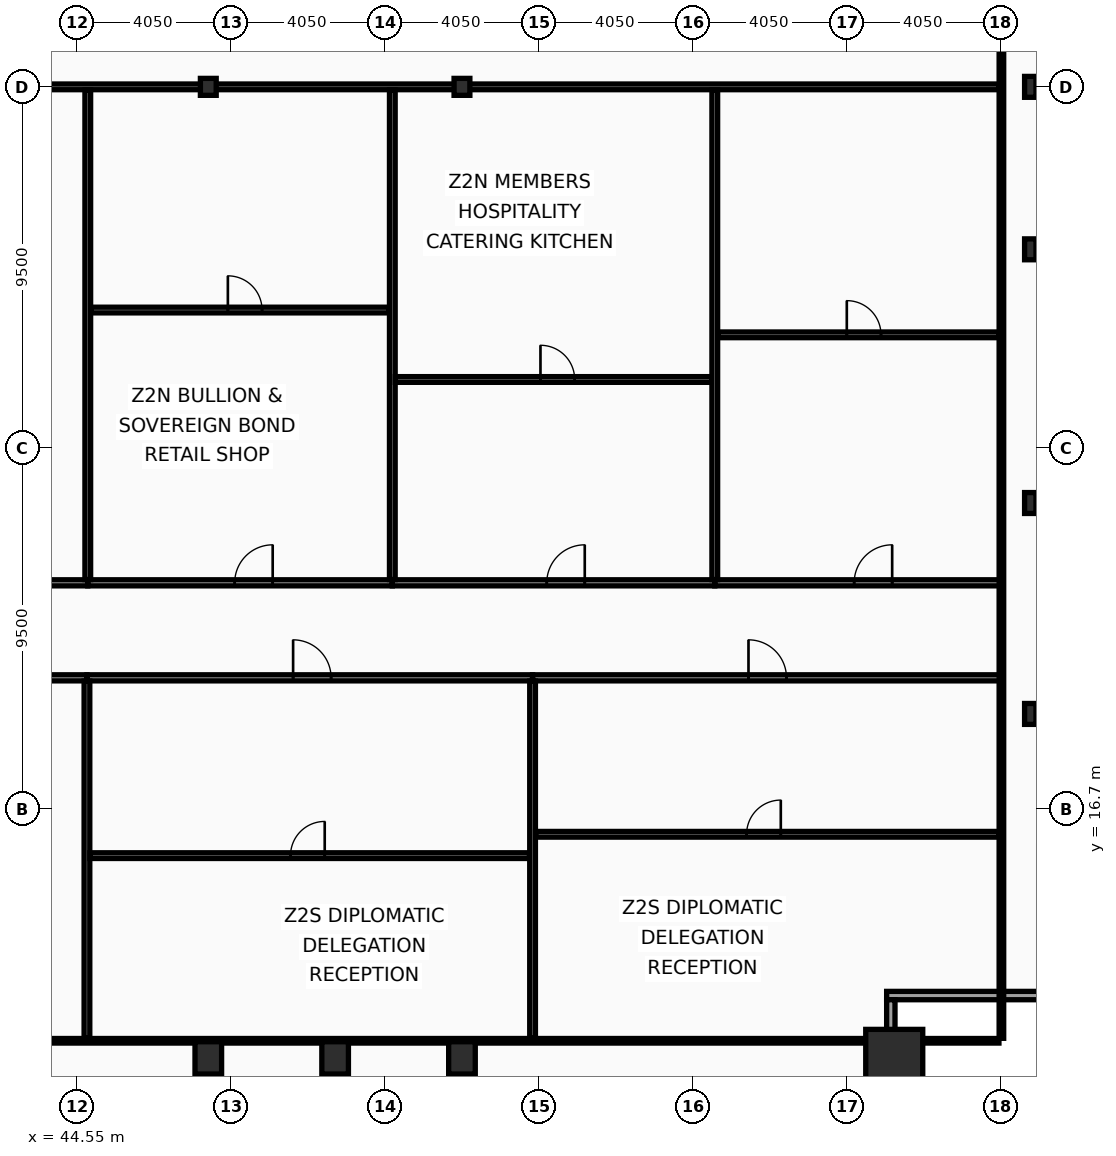
"""IFC4 building model, lengths in metres.
Left out: names, types, materials, properties, quantities, classifications, styles, units other than length and angle.
Written with IfcOpenShell. Run it as: python <this file> out.ifc"""

import sys

from ifc_helpers import new_model, si_unit, direction, frame, frame_2d, origin, origin_2d, place, context, subcontext, project, spatial, rectangle, hollow_rectangle, i_section, extrude, element, fill, save


model = new_model("IFC4")
c1 = context("Model", 3, precision=1e-05, world=origin(), true_north=direction((0.0, 1.0)))
c2 = subcontext(c1, "Body", "Model", "MODEL_VIEW")
j1 = project(units=[si_unit("LENGTHUNIT", "METRE"), si_unit("PLANEANGLEUNIT", "RADIAN")], contexts=[c1])
p1 = place(None, origin())
s1 = spatial("IfcSite", under=j1, at=p1, CompositionType="ELEMENT")
p2 = place(p1, origin())
s2 = spatial("IfcBuilding", under=s1, at=p2, CompositionType="ELEMENT")
p3 = place(p2, frame((0.0, 0.0, 121.8)))
s3 = spatial("IfcBuildingStorey", under=s2, at=p3, CompositionType="ELEMENT", Elevation=121.8)
p4 = place(p3, frame((66.05, 10.15, 0.0), z_axis=(0.0, 0.0, 1.0), x_axis=(1.0, 0.0, 0.0)))
e1 = element("IfcColumn", 1, at=p4, inside=s3, PredefinedType="COLUMN", context=c2, shape_type="SweptSolid", body=[
    extrude(hollow_rectangle(XDim=1.5, YDim=1.5, WallThickness=0.07, at=origin_2d()), origin(), (0.0, 0.0, 1.0), 3.6),
])
for number, where, z_axis, x_axis in (
    (2, (48.0, 10.15, 0.0), (0.0, 0.0, 1.0), (1.0, 0.0, 0.0)),
    (3, (51.337, 10.15, 0.0), (0.0, 0.0, 1.0), (1.0, 0.0, 0.0)),
    (4, (54.675, 10.15, 0.0), (0.0, 0.0, 1.0), (1.0, 0.0, 0.0)),
):
    element("IfcColumn", number, at=place(p3, frame(where, z_axis=z_axis, x_axis=x_axis)), inside=s3, PredefinedType="COLUMN", context=c2, shape_type="SweptSolid", body=[
        extrude(hollow_rectangle(XDim=0.7, YDim=0.85, WallThickness=0.05, at=origin_2d()), origin(), (0.0, 0.0, 1.0), 3.6),
    ])
for number, where, z_axis, x_axis in (
    (5, (69.63, 19.2, 0.0), (0.0, 0.0, 1.0), (1.0, 0.0, 0.0)),
    (6, (69.63, 24.75, 0.0), (0.0, 0.0, 1.0), (1.0, 0.0, 0.0)),
    (7, (69.63, 31.425, 0.0), (0.0, 0.0, 1.0), (1.0, 0.0, 0.0)),
    (8, (69.63, 35.7, 0.0), (0.0, 0.0, 1.0), (1.0, 0.0, 0.0)),
):
    element("IfcColumn", number, at=place(p3, frame(where, z_axis=z_axis, x_axis=x_axis)), inside=s3, PredefinedType="COLUMN", context=c2, shape_type="SweptSolid", body=[
        extrude(i_section(OverallWidth=0.3, OverallDepth=0.55, WebThickness=0.015, FlangeThickness=0.029, at=origin_2d()), origin(), (0.0, 0.0, 1.0), 3.6),
    ])
for number, where, z_axis, x_axis in (
    (9, (48.0, 35.7, 0.0), (0.0, 0.0, 1.0), (1.0, 0.0, 0.0)),
    (10, (54.675, 35.7, 0.0), (0.0, 0.0, 1.0), (1.0, 0.0, 0.0)),
):
    element("IfcColumn", number, at=place(p3, frame(where, z_axis=z_axis, x_axis=x_axis)), inside=s3, PredefinedType="COLUMN", context=c2, shape_type="SweptSolid", body=[
        extrude(i_section(OverallWidth=0.416, OverallDepth=0.446, WebThickness=0.039, FlangeThickness=0.063, at=origin_2d()), origin(), (0.0, 0.0, 1.0), 3.6),
    ])
p5 = place(p3, frame((70.07, 11.79, 0.0), z_axis=(0.0, 0.0, 1.0), x_axis=(-1.0, 0.0, 0.0)))
e11 = element("IfcWall", 11, at=p5, inside=s3, PredefinedType="SOLIDWALL", context=c2, shape_type="SweptSolid", body=[
    extrude(rectangle(XDim=4.22, YDim=0.22, at=frame_2d((2.11, 0.0))), origin(), (0.0, 0.0, 1.0), 2.83),
])
p6 = place(p3, frame((65.96, 11.68, 0.0), z_axis=(0.0, 0.0, 1.0), x_axis=(0.0, -1.0, 0.0)))
e12 = element("IfcWall", 12, at=p6, inside=s3, PredefinedType="SOLIDWALL", context=c2, shape_type="SweptSolid", body=[
    extrude(rectangle(XDim=3.91, YDim=0.22, at=frame_2d((1.955, 0.0))), origin(), (0.0, 0.0, 1.0), 2.83),
])
p7 = place(p3, frame((35.924, 20.15, 0.0), z_axis=(0.0, 0.0, 1.0), x_axis=(1.0, 0.0, 0.0)))
e13 = element("IfcWall", 13, at=p7, inside=s3, PredefinedType="PARTITIONING", context=c2, shape_type="SweptSolid", body=[
    extrude(rectangle(XDim=8.883, YDim=0.16, at=frame_2d((4.441, 0.0))), origin(), (0.0, 0.0, 1.0), 2.73),
])
p8 = place(p7, frame((4.231, 0.0, 0.0)))
e14 = element("IfcOpeningElement", 14, at=p8, cuts=e13, PredefinedType="OPENING", context=c2, shape_type="SweptSolid", body=[
    extrude(rectangle(XDim=1.0, YDim=2.05, at=frame_2d((0.5, 1.025))), frame((0.0, 0.09, 0.0), z_axis=(0.0, -1.0, 0.0), x_axis=(1.0, 0.0, 0.0)), (0.0, 0.0, 1.0), 0.18),
])
p9 = place(p3, frame((44.807, 20.15, 0.0), z_axis=(0.0, 0.0, 1.0), x_axis=(1.0, 0.0, 0.0)))
e15 = element("IfcWall", 15, at=p9, inside=s3, PredefinedType="PARTITIONING", context=c2, shape_type="SweptSolid", body=[
    extrude(rectangle(XDim=11.727, YDim=0.16, at=frame_2d((5.863, 0.0))), origin(), (0.0, 0.0, 1.0), 2.73),
])
p10 = place(p9, frame((5.425, 0.0, 0.0)))
e16 = element("IfcOpeningElement", 16, at=p10, cuts=e15, PredefinedType="OPENING", context=c2, shape_type="SweptSolid", body=[
    extrude(rectangle(XDim=1.0, YDim=2.05, at=frame_2d((0.5, 1.025))), frame((0.0, 0.09, 0.0), z_axis=(0.0, -1.0, 0.0), x_axis=(1.0, 0.0, 0.0)), (0.0, 0.0, 1.0), 0.18),
])
p11 = place(p3, frame((44.807, 10.665, 0.0), z_axis=(0.0, 0.0, 1.0), x_axis=(0.0, 1.0, 0.0)))
e17 = element("IfcWall", 17, at=p11, inside=s3, PredefinedType="PARTITIONING", context=c2, shape_type="SweptSolid", body=[
    extrude(rectangle(XDim=9.4, YDim=0.15, at=frame_2d((4.7, 0.0))), origin(), (0.0, 0.0, 1.0), 2.88),
])
p12 = place(p3, frame((44.887, 15.472, 0.0), z_axis=(0.0, 0.0, 1.0), x_axis=(1.0, 0.0, 0.0)))
e18 = element("IfcWall", 18, at=p12, inside=s3, PredefinedType="PARTITIONING", context=c2, shape_type="SweptSolid", body=[
    extrude(rectangle(XDim=11.566, YDim=0.15, at=frame_2d((5.783, 0.0))), origin(), (0.0, 0.0, 1.0), 2.73),
])
p13 = place(p12, frame((5.277, 0.0, 0.0)))
e19 = element("IfcOpeningElement", 19, at=p13, cuts=e18, PredefinedType="OPENING", context=c2, shape_type="SweptSolid", body=[
    extrude(rectangle(XDim=0.9, YDim=2.05, at=frame_2d((0.45, 1.025))), frame((0.0, 0.085, 0.0), z_axis=(0.0, -1.0, 0.0), x_axis=(1.0, 0.0, 0.0)), (0.0, 0.0, 1.0), 0.17),
])
p14 = place(p3, frame((56.533, 20.15, 0.0), z_axis=(0.0, 0.0, 1.0), x_axis=(1.0, 0.0, 0.0)))
e20 = element("IfcWall", 20, at=p14, inside=s3, PredefinedType="PARTITIONING", context=c2, shape_type="SweptSolid", body=[
    extrude(rectangle(XDim=12.337, YDim=0.16, at=frame_2d((6.168, 0.0))), origin(), (0.0, 0.0, 1.0), 3.44),
])
p15 = place(p14, frame((5.681, 0.0, 0.0)))
e21 = element("IfcOpeningElement", 21, at=p15, cuts=e20, PredefinedType="OPENING", context=c2, shape_type="SweptSolid", body=[
    extrude(rectangle(XDim=1.0, YDim=2.05, at=frame_2d((0.5, 1.025))), frame((0.0, 0.09, 0.0), z_axis=(0.0, -1.0, 0.0), x_axis=(1.0, 0.0, 0.0)), (0.0, 0.0, 1.0), 0.18),
])
p16 = place(p3, frame((56.533, 10.665, 0.0), z_axis=(0.0, 0.0, 1.0), x_axis=(0.0, 1.0, 0.0)))
e22 = element("IfcWall", 22, at=p16, inside=s3, PredefinedType="PARTITIONING", context=c2, shape_type="SweptSolid", body=[
    extrude(rectangle(XDim=9.4, YDim=0.15, at=frame_2d((4.7, 0.0))), origin(), (0.0, 0.0, 1.0), 2.73),
])
p17 = place(p3, frame((56.613, 16.034, 0.0), z_axis=(0.0, 0.0, 1.0), x_axis=(1.0, 0.0, 0.0)))
e23 = element("IfcWall", 23, at=p17, inside=s3, PredefinedType="PARTITIONING", context=c2, shape_type="SweptSolid", body=[
    extrude(rectangle(XDim=12.192, YDim=0.15, at=frame_2d((6.096, 0.0))), origin(), (0.0, 0.0, 1.0), 2.83),
])
p18 = place(p17, frame((5.552, 0.0, 0.0)))
e24 = element("IfcOpeningElement", 24, at=p18, cuts=e23, PredefinedType="OPENING", context=c2, shape_type="SweptSolid", body=[
    extrude(rectangle(XDim=0.9, YDim=2.05, at=frame_2d((0.45, 1.025))), frame((0.0, 0.085, 0.0), z_axis=(0.0, -1.0, 0.0), x_axis=(1.0, 0.0, 0.0)), (0.0, 0.0, 1.0), 0.17),
])
p19 = place(p3, frame((21.81, 35.7, 0.0), z_axis=(0.0, 0.0, 1.0), x_axis=(1.0, 0.0, 0.0)))
e25 = element("IfcWall", 25, at=p19, inside=s3, PredefinedType="PARTITIONING", context=c2, shape_type="SweptSolid", body=[
    extrude(rectangle(XDim=46.995, YDim=0.15, at=frame_2d((23.498, 0.0))), origin(), (0.0, 0.0, 1.0), 2.73),
])
p20 = place(p3, frame((36.344, 22.65, 0.0), z_axis=(0.0, 0.0, 1.0), x_axis=(1.0, 0.0, 0.0)))
e26 = element("IfcWall", 26, at=p20, inside=s3, PredefinedType="PARTITIONING", context=c2, shape_type="SweptSolid", body=[
    extrude(rectangle(XDim=8.485, YDim=0.16, at=frame_2d((4.243, 0.0))), origin(), (0.0, 0.0, 1.0), 2.73),
])
p21 = place(p20, frame((4.064, 0.0, 0.0)))
e27 = element("IfcOpeningElement", 27, at=p21, cuts=e26, PredefinedType="OPENING", context=c2, shape_type="SweptSolid", body=[
    extrude(rectangle(XDim=1.0, YDim=2.05, at=frame_2d((0.5, 1.025))), frame((0.0, 0.09, 0.0), z_axis=(0.0, -1.0, 0.0), x_axis=(1.0, 0.0, 0.0)), (0.0, 0.0, 1.0), 0.18),
])
p22 = place(p3, frame((44.829, 22.65, 0.0), z_axis=(0.0, 0.0, 1.0), x_axis=(1.0, 0.0, 0.0)))
e28 = element("IfcWall", 28, at=p22, inside=s3, PredefinedType="PARTITIONING", context=c2, shape_type="SweptSolid", body=[
    extrude(rectangle(XDim=8.014, YDim=0.16, at=frame_2d((4.007, 0.0))), origin(), (0.0, 0.0, 1.0), 2.73),
])
p23 = place(p22, frame((3.866, 0.0, 0.0)))
e29 = element("IfcOpeningElement", 29, at=p23, cuts=e28, PredefinedType="OPENING", context=c2, shape_type="SweptSolid", body=[
    extrude(rectangle(XDim=1.0, YDim=2.05, at=frame_2d((0.5, 1.025))), frame((0.0, 0.09, 0.0), z_axis=(0.0, -1.0, 0.0), x_axis=(1.0, 0.0, 0.0)), (0.0, 0.0, 1.0), 0.18),
])
p24 = place(p3, frame((44.829, 22.735, 0.0), z_axis=(0.0, 0.0, 1.0), x_axis=(0.0, 1.0, 0.0)))
e30 = element("IfcWall", 30, at=p24, inside=s3, PredefinedType="PARTITIONING", context=c2, shape_type="SweptSolid", body=[
    extrude(rectangle(XDim=12.885, YDim=0.15, at=frame_2d((6.442, 0.0))), origin(), (0.0, 0.0, 1.0), 2.88),
])
p25 = place(p3, frame((44.909, 29.827, 0.0), z_axis=(0.0, 0.0, 1.0), x_axis=(1.0, 0.0, 0.0)))
e31 = element("IfcWall", 31, at=p25, inside=s3, PredefinedType="PARTITIONING", context=c2, shape_type="SweptSolid", body=[
    extrude(rectangle(XDim=7.854, YDim=0.15, at=frame_2d((3.927, 0.0))), origin(), (0.0, 0.0, 1.0), 2.73),
])
p26 = place(p25, frame((3.606, 0.0, 0.0)))
e32 = element("IfcOpeningElement", 32, at=p26, cuts=e31, PredefinedType="OPENING", context=c2, shape_type="SweptSolid", body=[
    extrude(rectangle(XDim=0.9, YDim=2.05, at=frame_2d((0.45, 1.025))), frame((0.0, 0.085, 0.0), z_axis=(0.0, -1.0, 0.0), x_axis=(1.0, 0.0, 0.0)), (0.0, 0.0, 1.0), 0.17),
])
p27 = place(p3, frame((52.842, 22.65, 0.0), z_axis=(0.0, 0.0, 1.0), x_axis=(1.0, 0.0, 0.0)))
e33 = element("IfcWall", 33, at=p27, inside=s3, PredefinedType="PARTITIONING", context=c2, shape_type="SweptSolid", body=[
    extrude(rectangle(XDim=8.485, YDim=0.16, at=frame_2d((4.243, 0.0))), origin(), (0.0, 0.0, 1.0), 2.73),
])
p28 = place(p27, frame((4.064, 0.0, 0.0)))
e34 = element("IfcOpeningElement", 34, at=p28, cuts=e33, PredefinedType="OPENING", context=c2, shape_type="SweptSolid", body=[
    extrude(rectangle(XDim=1.0, YDim=2.05, at=frame_2d((0.5, 1.025))), frame((0.0, 0.09, 0.0), z_axis=(0.0, -1.0, 0.0), x_axis=(1.0, 0.0, 0.0)), (0.0, 0.0, 1.0), 0.18),
])
p29 = place(p3, frame((52.842, 22.735, 0.0), z_axis=(0.0, 0.0, 1.0), x_axis=(0.0, 1.0, 0.0)))
e35 = element("IfcWall", 35, at=p29, inside=s3, PredefinedType="PARTITIONING", context=c2, shape_type="SweptSolid", body=[
    extrude(rectangle(XDim=12.885, YDim=0.15, at=frame_2d((6.442, 0.0))), origin(), (0.0, 0.0, 1.0), 2.88),
])
p30 = place(p3, frame((52.922, 28.0, 0.0), z_axis=(0.0, 0.0, 1.0), x_axis=(1.0, 0.0, 0.0)))
e36 = element("IfcWall", 36, at=p30, inside=s3, PredefinedType="PARTITIONING", context=c2, shape_type="SweptSolid", body=[
    extrude(rectangle(XDim=8.325, YDim=0.15, at=frame_2d((4.163, 0.0))), origin(), (0.0, 0.0, 1.0), 2.73),
])
p31 = place(p30, frame((3.818, 0.0, 0.0)))
e37 = element("IfcOpeningElement", 37, at=p31, cuts=e36, PredefinedType="OPENING", context=c2, shape_type="SweptSolid", body=[
    extrude(rectangle(XDim=0.9, YDim=2.05, at=frame_2d((0.45, 1.025))), frame((0.0, 0.085, 0.0), z_axis=(0.0, -1.0, 0.0), x_axis=(1.0, 0.0, 0.0)), (0.0, 0.0, 1.0), 0.17),
])
p32 = place(p3, frame((61.328, 22.65, 0.0), z_axis=(0.0, 0.0, 1.0), x_axis=(1.0, 0.0, 0.0)))
e38 = element("IfcWall", 38, at=p32, inside=s3, PredefinedType="PARTITIONING", context=c2, shape_type="SweptSolid", body=[
    extrude(rectangle(XDim=7.542, YDim=0.16, at=frame_2d((3.771, 0.0))), origin(), (0.0, 0.0, 1.0), 3.44),
])
p33 = place(p32, frame((3.668, 0.0, 0.0)))
e39 = element("IfcOpeningElement", 39, at=p33, cuts=e38, PredefinedType="OPENING", context=c2, shape_type="SweptSolid", body=[
    extrude(rectangle(XDim=1.0, YDim=2.05, at=frame_2d((0.5, 1.025))), frame((0.0, 0.09, 0.0), z_axis=(0.0, -1.0, 0.0), x_axis=(1.0, 0.0, 0.0)), (0.0, 0.0, 1.0), 0.18),
])
p34 = place(p3, frame((61.328, 22.735, 0.0), z_axis=(0.0, 0.0, 1.0), x_axis=(0.0, 1.0, 0.0)))
e40 = element("IfcWall", 40, at=p34, inside=s3, PredefinedType="PARTITIONING", context=c2, shape_type="SweptSolid", body=[
    extrude(rectangle(XDim=12.885, YDim=0.15, at=frame_2d((6.442, 0.0))), origin(), (0.0, 0.0, 1.0), 2.73),
])
p35 = place(p3, frame((61.408, 29.175, 0.0), z_axis=(0.0, 0.0, 1.0), x_axis=(1.0, 0.0, 0.0)))
e41 = element("IfcWall", 41, at=p35, inside=s3, PredefinedType="PARTITIONING", context=c2, shape_type="SweptSolid", body=[
    extrude(rectangle(XDim=7.397, YDim=0.15, at=frame_2d((3.699, 0.0))), origin(), (0.0, 0.0, 1.0), 3.44),
])
p36 = place(p35, frame((3.394, 0.0, 0.0)))
e42 = element("IfcOpeningElement", 42, at=p36, cuts=e41, PredefinedType="OPENING", context=c2, shape_type="SweptSolid", body=[
    extrude(rectangle(XDim=0.9, YDim=2.05, at=frame_2d((0.45, 1.025))), frame((0.0, 0.085, 0.0), z_axis=(0.0, -1.0, 0.0), x_axis=(1.0, 0.0, 0.0)), (0.0, 0.0, 1.0), 0.17),
])
p37 = place(p3, frame((68.87, 10.665, 0.0), z_axis=(0.0, 0.0, 1.0), x_axis=(0.0, 1.0, 0.0)))
e43 = element("IfcWall", 43, at=p37, inside=s3, PredefinedType="PARTITIONING", context=c2, shape_type="SweptSolid", body=[
    extrude(rectangle(XDim=42.11, YDim=0.12, at=frame_2d((21.055, 0.0))), origin(), (0.0, 0.0, 1.0), 2.73),
])
p38 = place(p3, frame((4.095, 10.6, 0.0), z_axis=(0.0, 0.0, 1.0), x_axis=(1.0, 0.0, 0.0)))
e44 = element("IfcWall", 44, at=p38, inside=s3, PredefinedType="PARTITIONING", context=c2, shape_type="SweptSolid", body=[
    extrude(rectangle(XDim=64.71, YDim=0.12, at=frame_2d((32.355, 0.0))), origin(), (0.0, 0.0, 1.0), 2.73),
])
p39 = place(p10, origin())
e45 = element("IfcDoor", 45, at=p39, inside=s3, OperationType="SINGLE_SWING_LEFT", PredefinedType="DOOR", context=c2, shape_type="SweptSolid", body=[
    extrude(rectangle(XDim=1.0, YDim=2.05, at=frame_2d((0.5, 1.025))), frame((0.0, 0.025, 0.0), z_axis=(0.0, -1.0, 0.0), x_axis=(1.0, 0.0, 0.0)), (0.0, 0.0, 1.0), 0.05),
])
fill(e16, e45)
p40 = place(p13, origin())
e46 = element("IfcDoor", 46, at=p40, inside=s3, OperationType="SINGLE_SWING_RIGHT", PredefinedType="DOOR", context=c2, shape_type="SweptSolid", body=[
    extrude(rectangle(XDim=0.9, YDim=2.05, at=frame_2d((0.45, 1.025))), frame((0.0, 0.025, 0.0), z_axis=(0.0, -1.0, 0.0), x_axis=(1.0, 0.0, 0.0)), (0.0, 0.0, 1.0), 0.05),
])
fill(e19, e46)
p41 = place(p15, origin())
e47 = element("IfcDoor", 47, at=p41, inside=s3, OperationType="SINGLE_SWING_LEFT", PredefinedType="DOOR", context=c2, shape_type="SweptSolid", body=[
    extrude(rectangle(XDim=1.0, YDim=2.05, at=frame_2d((0.5, 1.025))), frame((0.0, 0.025, 0.0), z_axis=(0.0, -1.0, 0.0), x_axis=(1.0, 0.0, 0.0)), (0.0, 0.0, 1.0), 0.05),
])
fill(e21, e47)
p42 = place(p18, origin())
e48 = element("IfcDoor", 48, at=p42, inside=s3, OperationType="SINGLE_SWING_RIGHT", PredefinedType="DOOR", context=c2, shape_type="SweptSolid", body=[
    extrude(rectangle(XDim=0.9, YDim=2.05, at=frame_2d((0.45, 1.025))), frame((0.0, 0.025, 0.0), z_axis=(0.0, -1.0, 0.0), x_axis=(1.0, 0.0, 0.0)), (0.0, 0.0, 1.0), 0.05),
])
fill(e24, e48)
p43 = place(p23, origin())
e49 = element("IfcDoor", 49, at=p43, inside=s3, OperationType="SINGLE_SWING_RIGHT", PredefinedType="DOOR", context=c2, shape_type="SweptSolid", body=[
    extrude(rectangle(XDim=1.0, YDim=2.05, at=frame_2d((0.5, 1.025))), frame((0.0, 0.025, 0.0), z_axis=(0.0, -1.0, 0.0), x_axis=(1.0, 0.0, 0.0)), (0.0, 0.0, 1.0), 0.05),
])
fill(e29, e49)
p44 = place(p26, origin())
e50 = element("IfcDoor", 50, at=p44, inside=s3, OperationType="SINGLE_SWING_LEFT", PredefinedType="DOOR", context=c2, shape_type="SweptSolid", body=[
    extrude(rectangle(XDim=0.9, YDim=2.05, at=frame_2d((0.45, 1.025))), frame((0.0, 0.025, 0.0), z_axis=(0.0, -1.0, 0.0), x_axis=(1.0, 0.0, 0.0)), (0.0, 0.0, 1.0), 0.05),
])
fill(e32, e50)
p45 = place(p28, origin())
e51 = element("IfcDoor", 51, at=p45, inside=s3, OperationType="SINGLE_SWING_RIGHT", PredefinedType="DOOR", context=c2, shape_type="SweptSolid", body=[
    extrude(rectangle(XDim=1.0, YDim=2.05, at=frame_2d((0.5, 1.025))), frame((0.0, 0.025, 0.0), z_axis=(0.0, -1.0, 0.0), x_axis=(1.0, 0.0, 0.0)), (0.0, 0.0, 1.0), 0.05),
])
fill(e34, e51)
p46 = place(p31, origin())
e52 = element("IfcDoor", 52, at=p46, inside=s3, OperationType="SINGLE_SWING_LEFT", PredefinedType="DOOR", context=c2, shape_type="SweptSolid", body=[
    extrude(rectangle(XDim=0.9, YDim=2.05, at=frame_2d((0.45, 1.025))), frame((0.0, 0.025, 0.0), z_axis=(0.0, -1.0, 0.0), x_axis=(1.0, 0.0, 0.0)), (0.0, 0.0, 1.0), 0.05),
])
fill(e37, e52)
p47 = place(p33, origin())
e53 = element("IfcDoor", 53, at=p47, inside=s3, OperationType="SINGLE_SWING_RIGHT", PredefinedType="DOOR", context=c2, shape_type="SweptSolid", body=[
    extrude(rectangle(XDim=1.0, YDim=2.05, at=frame_2d((0.5, 1.025))), frame((0.0, 0.025, 0.0), z_axis=(0.0, -1.0, 0.0), x_axis=(1.0, 0.0, 0.0)), (0.0, 0.0, 1.0), 0.05),
])
fill(e39, e53)
p48 = place(p36, origin())
e54 = element("IfcDoor", 54, at=p48, inside=s3, OperationType="SINGLE_SWING_LEFT", PredefinedType="DOOR", context=c2, shape_type="SweptSolid", body=[
    extrude(rectangle(XDim=0.9, YDim=2.05, at=frame_2d((0.45, 1.025))), frame((0.0, 0.025, 0.0), z_axis=(0.0, -1.0, 0.0), x_axis=(1.0, 0.0, 0.0)), (0.0, 0.0, 1.0), 0.05),
])
fill(e42, e54)
save(model, sys.argv[1])
